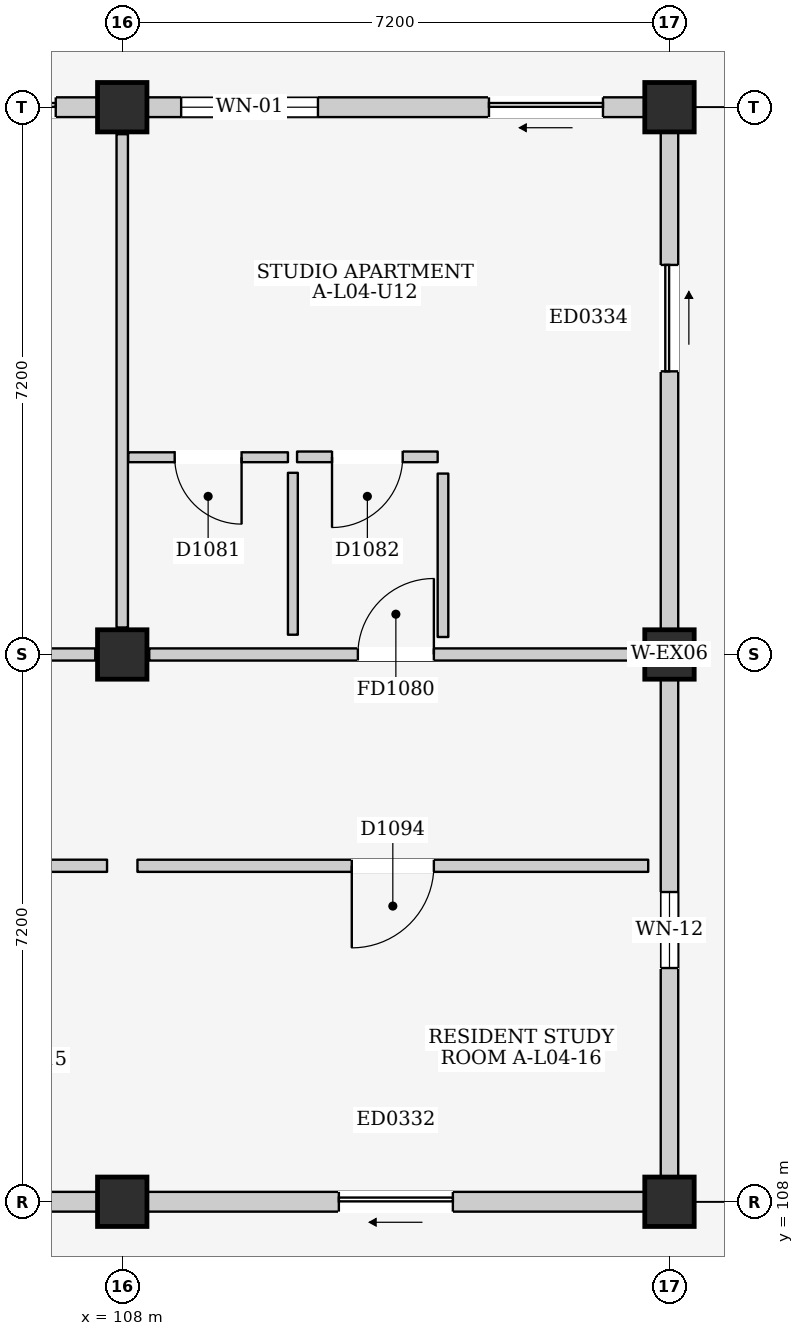
"""IFC4 building model, lengths in metres.
Left out: names, types, materials, properties, quantities, classifications, styles, units other than length and angle.
Written with IfcOpenShell. Run it as: python <this file> out.ifc"""

import sys

from ifc_helpers import new_model, si_unit, direction, frame, frame_2d, origin, origin_2d, place, context, subcontext, project, spatial, rectangle, extrude, element, fill, save


model = new_model("IFC4")
c1 = context("Model", 3, precision=1e-05, world=origin(), true_north=direction((0.0, 1.0)))
c2 = subcontext(c1, "Body", "Model", "MODEL_VIEW")
j1 = project(units=[si_unit("LENGTHUNIT", "METRE"), si_unit("PLANEANGLEUNIT", "RADIAN")], contexts=[c1])
p1 = place(None, origin())
s1 = spatial("IfcSite", under=j1, at=p1, CompositionType="ELEMENT")
p2 = place(p1, origin())
s2 = spatial("IfcBuilding", under=s1, at=p2, CompositionType="ELEMENT")
p3 = place(p2, frame((0.0, 0.0, 15.4)))
s3 = spatial("IfcBuildingStorey", under=s2, at=p3, CompositionType="ELEMENT", Elevation=15.4)
for number, where, z_axis, x_axis in (
    (1, (108.0, 108.0, 0.0), (0.0, 0.0, 1.0), (1.0, 0.0, 0.0)),
    (2, (108.0, 115.2, 0.0), (0.0, 0.0, 1.0), (1.0, 0.0, 0.0)),
    (3, (108.0, 122.4, 0.0), (0.0, 0.0, 1.0), (1.0, 0.0, 0.0)),
    (4, (115.2, 108.0, 0.0), (0.0, 0.0, 1.0), (1.0, 0.0, 0.0)),
    (5, (115.2, 115.2, 0.0), (0.0, 0.0, 1.0), (1.0, 0.0, 0.0)),
    (6, (115.2, 122.4, 0.0), (0.0, 0.0, 1.0), (1.0, 0.0, 0.0)),
):
    element("IfcColumn", number, at=place(p3, frame(where, z_axis=z_axis, x_axis=x_axis)), inside=s3, PredefinedType="COLUMN", context=c2, shape_type="SweptSolid", body=[
        extrude(rectangle(XDim=0.65, YDim=0.65, at=origin_2d()), origin(), (0.0, 0.0, 1.0), 3.2),
    ])
p4 = place(p3, frame((101.125, 122.4, 0.0), z_axis=(0.0, 0.0, 1.0), x_axis=(1.0, 0.0, 0.0)))
e7 = element("IfcWall", 7, at=p4, inside=s3, PredefinedType="ELEMENTEDWALL", context=c2, shape_type="SweptSolid", body=[
    extrude(rectangle(XDim=6.55, YDim=0.26, at=frame_2d((3.275, 0.0))), origin(), (0.0, 0.0, 1.0), 2.43),
])
p5 = place(p4, frame((4.4, 0.0, 0.0)))
e8 = element("IfcOpeningElement", 8, at=p5, cuts=e7, PredefinedType="OPENING", context=c2, shape_type="SweptSolid", body=[
    extrude(rectangle(XDim=1.6, YDim=2.12, at=frame_2d((0.8, 1.06))), frame((0.0, 0.145, 0.0), z_axis=(0.0, -1.0, 0.0), x_axis=(1.0, 0.0, 0.0)), (0.0, 0.0, 1.0), 0.29),
])
p6 = place(p4, frame((0.45, 0.0, 0.76)))
e9 = element("IfcOpeningElement", 9, at=p6, cuts=e7, PredefinedType="OPENING", context=c2, shape_type="SweptSolid", body=[
    extrude(rectangle(XDim=1.75, YDim=1.55, at=frame_2d((0.875, 0.775))), frame((0.0, 0.145, 0.0), z_axis=(0.0, -1.0, 0.0), x_axis=(1.0, 0.0, 0.0)), (0.0, 0.0, 1.0), 0.29),
])
p7 = place(p3, frame((101.125, 108.0, 0.0), z_axis=(0.0, 0.0, 1.0), x_axis=(1.0, 0.0, 0.0)))
e10 = element("IfcWall", 10, at=p7, inside=s3, PredefinedType="ELEMENTEDWALL", context=c2, shape_type="SweptSolid", body=[
    extrude(rectangle(XDim=6.55, YDim=0.26, at=frame_2d((3.275, 0.0))), origin(), (0.0, 0.0, 1.0), 2.285),
])
p8 = place(p7, frame((2.525, 0.0, 0.0)))
e11 = element("IfcOpeningElement", 11, at=p8, cuts=e10, PredefinedType="OPENING", context=c2, shape_type="SweptSolid", body=[
    extrude(rectangle(XDim=1.5, YDim=2.12, at=frame_2d((0.75, 1.06))), frame((0.0, 0.145, 0.0), z_axis=(0.0, -1.0, 0.0), x_axis=(1.0, 0.0, 0.0)), (0.0, 0.0, 1.0), 0.29),
])
p9 = place(p3, frame((108.325, 122.4, 0.0), z_axis=(0.0, 0.0, 1.0), x_axis=(1.0, 0.0, 0.0)))
e12 = element("IfcWall", 12, at=p9, inside=s3, PredefinedType="ELEMENTEDWALL", context=c2, shape_type="SweptSolid", body=[
    extrude(rectangle(XDim=6.55, YDim=0.26, at=frame_2d((3.275, 0.0))), origin(), (0.0, 0.0, 1.0), 2.43),
])
p10 = place(p9, frame((4.5, 0.0, 0.0)))
e13 = element("IfcOpeningElement", 13, at=p10, cuts=e12, PredefinedType="OPENING", context=c2, shape_type="SweptSolid", body=[
    extrude(rectangle(XDim=1.5, YDim=2.12, at=frame_2d((0.75, 1.06))), frame((0.0, 0.145, 0.0), z_axis=(0.0, -1.0, 0.0), x_axis=(1.0, 0.0, 0.0)), (0.0, 0.0, 1.0), 0.29),
])
p11 = place(p9, frame((0.45, 0.0, 0.81)))
e14 = element("IfcOpeningElement", 14, at=p11, cuts=e12, PredefinedType="OPENING", context=c2, shape_type="SweptSolid", body=[
    extrude(rectangle(XDim=1.8, YDim=1.5, at=frame_2d((0.9, 0.75))), frame((0.0, 0.145, 0.0), z_axis=(0.0, -1.0, 0.0), x_axis=(1.0, 0.0, 0.0)), (0.0, 0.0, 1.0), 0.29),
])
p12 = place(p3, frame((108.325, 108.0, 0.0), z_axis=(0.0, 0.0, 1.0), x_axis=(1.0, 0.0, 0.0)))
e15 = element("IfcWall", 15, at=p12, inside=s3, PredefinedType="ELEMENTEDWALL", context=c2, shape_type="SweptSolid", body=[
    extrude(rectangle(XDim=6.55, YDim=0.26, at=frame_2d((3.275, 0.0))), origin(), (0.0, 0.0, 1.0), 2.285),
])
p13 = place(p12, frame((2.525, 0.0, 0.0)))
e16 = element("IfcOpeningElement", 16, at=p13, cuts=e15, PredefinedType="OPENING", context=c2, shape_type="SweptSolid", body=[
    extrude(rectangle(XDim=1.5, YDim=2.12, at=frame_2d((0.75, 1.06))), frame((0.0, 0.145, 0.0), z_axis=(0.0, -1.0, 0.0), x_axis=(1.0, 0.0, 0.0)), (0.0, 0.0, 1.0), 0.29),
])
p14 = place(p3, frame((115.2, 108.325, 0.0), z_axis=(0.0, 0.0, 1.0), x_axis=(0.0, 1.0, 0.0)))
e17 = element("IfcWall", 17, at=p14, inside=s3, PredefinedType="ELEMENTEDWALL", context=c2, shape_type="SweptSolid", body=[
    extrude(rectangle(XDim=6.55, YDim=0.23, at=frame_2d((3.275, 0.0))), origin(), (0.0, 0.0, 1.0), 2.43),
])
p15 = place(p14, frame((2.75, 0.0, 1.1)))
e18 = element("IfcOpeningElement", 18, at=p15, cuts=e17, PredefinedType="OPENING", context=c2, shape_type="SweptSolid", body=[
    extrude(rectangle(XDim=1.0, YDim=0.9, at=frame_2d((0.5, 0.45))), frame((0.0, 0.13, 0.0), z_axis=(0.0, -1.0, 0.0), x_axis=(1.0, 0.0, 0.0)), (0.0, 0.0, 1.0), 0.26),
])
p16 = place(p3, frame((115.2, 115.525, 0.0), z_axis=(0.0, 0.0, 1.0), x_axis=(0.0, 1.0, 0.0)))
e19 = element("IfcWall", 19, at=p16, inside=s3, PredefinedType="ELEMENTEDWALL", context=c2, shape_type="SweptSolid", body=[
    extrude(rectangle(XDim=6.55, YDim=0.23, at=frame_2d((3.275, 0.0))), origin(), (0.0, 0.0, 1.0), 2.43),
])
p17 = place(p16, frame((3.4, 0.0, 0.0)))
e20 = element("IfcOpeningElement", 20, at=p17, cuts=e19, PredefinedType="OPENING", context=c2, shape_type="SweptSolid", body=[
    extrude(rectangle(XDim=1.4, YDim=2.1, at=frame_2d((0.7, 1.05))), frame((0.0, 0.13, 0.0), z_axis=(0.0, -1.0, 0.0), x_axis=(1.0, 0.0, 0.0)), (0.0, 0.0, 1.0), 0.26),
])
p18 = place(p3, frame((101.155, 115.2, 0.0), z_axis=(0.0, 0.0, 1.0), x_axis=(1.0, 0.0, 0.0)))
e21 = element("IfcWall", 21, at=p18, inside=s3, PredefinedType="PARTITIONING", context=c2, shape_type="SweptSolid", body=[
    extrude(rectangle(XDim=6.49, YDim=0.16, at=frame_2d((3.245, 0.0))), origin(), (0.0, 0.0, 1.0), 2.285),
])
p19 = place(p18, frame((2.745, 0.0, 0.0)))
e22 = element("IfcOpeningElement", 22, at=p19, cuts=e21, PredefinedType="OPENING", context=c2, shape_type="SweptSolid", body=[
    extrude(rectangle(XDim=1.0, YDim=2.15, at=frame_2d((0.5, 1.075))), frame((0.0, 0.095, 0.0), z_axis=(0.0, -1.0, 0.0), x_axis=(1.0, 0.0, 0.0)), (0.0, 0.0, 1.0), 0.19),
])
p20 = place(p3, frame((108.0, 115.555, 0.0), z_axis=(0.0, 0.0, 1.0), x_axis=(0.0, 1.0, 0.0)))
e23 = element("IfcWall", 23, at=p20, inside=s3, PredefinedType="PARTITIONING", context=c2, shape_type="SweptSolid", body=[
    extrude(rectangle(XDim=6.49, YDim=0.15, at=frame_2d((3.245, 0.0))), origin(), (0.0, 0.0, 1.0), 2.385),
])
p21 = place(p3, frame((108.355, 115.2, 0.0), z_axis=(0.0, 0.0, 1.0), x_axis=(1.0, 0.0, 0.0)))
e24 = element("IfcWall", 24, at=p21, inside=s3, PredefinedType="PARTITIONING", context=c2, shape_type="SweptSolid", body=[
    extrude(rectangle(XDim=6.49, YDim=0.16, at=frame_2d((3.245, 0.0))), origin(), (0.0, 0.0, 1.0), 2.285),
])
p22 = place(p21, frame((2.745, 0.0, 0.0)))
e25 = element("IfcOpeningElement", 25, at=p22, cuts=e24, PredefinedType="OPENING", context=c2, shape_type="SweptSolid", body=[
    extrude(rectangle(XDim=1.0, YDim=2.15, at=frame_2d((0.5, 1.075))), frame((0.0, 0.095, 0.0), z_axis=(0.0, -1.0, 0.0), x_axis=(1.0, 0.0, 0.0)), (0.0, 0.0, 1.0), 0.19),
])
p23 = place(p3, frame((108.08, 117.795, 0.0), z_axis=(0.0, 0.0, 1.0), x_axis=(1.0, 0.0, 0.0)))
e26 = element("IfcWall", 26, at=p23, inside=s3, PredefinedType="PARTITIONING", context=c2, shape_type="SweptSolid", body=[
    extrude(rectangle(XDim=2.1, YDim=0.13, at=frame_2d((1.05, 0.0))), origin(), (0.0, 0.0, 1.0), 2.95),
])
p24 = place(p23, frame((0.61, 0.0, 0.0)))
e27 = element("IfcOpeningElement", 27, at=p24, cuts=e26, PredefinedType="OPENING", context=c2, shape_type="SweptSolid", body=[
    extrude(rectangle(XDim=0.88, YDim=2.1, at=frame_2d((0.44, 1.05))), frame((0.0, 0.08, 0.0), z_axis=(0.0, -1.0, 0.0), x_axis=(1.0, 0.0, 0.0)), (0.0, 0.0, 1.0), 0.16),
])
p25 = place(p3, frame((110.245, 115.46, 0.0), z_axis=(0.0, 0.0, 1.0), x_axis=(0.0, 1.0, 0.0)))
e28 = element("IfcWall", 28, at=p25, inside=s3, PredefinedType="PARTITIONING", context=c2, shape_type="SweptSolid", body=[
    extrude(rectangle(XDim=2.13, YDim=0.13, at=frame_2d((1.065, 0.0))), origin(), (0.0, 0.0, 1.0), 2.95),
])
p26 = place(p3, frame((110.3, 117.8, 0.0), z_axis=(0.0, 0.0, 1.0), x_axis=(1.0, 0.0, 0.0)))
e29 = element("IfcWall", 29, at=p26, inside=s3, PredefinedType="PARTITIONING", context=c2, shape_type="SweptSolid", body=[
    extrude(rectangle(XDim=1.85, YDim=0.14, at=frame_2d((0.925, 0.0))), origin(), (0.0, 0.0, 1.0), 2.95),
])
p27 = place(p26, frame((0.46, 0.0, 0.0)))
e30 = element("IfcOpeningElement", 30, at=p27, cuts=e29, PredefinedType="OPENING", context=c2, shape_type="SweptSolid", body=[
    extrude(rectangle(XDim=0.93, YDim=2.14, at=frame_2d((0.465, 1.07))), frame((0.0, 0.085, 0.0), z_axis=(0.0, -1.0, 0.0), x_axis=(1.0, 0.0, 0.0)), (0.0, 0.0, 1.0), 0.17),
])
p28 = place(p3, frame((112.22, 115.43, 0.0), z_axis=(0.0, 0.0, 1.0), x_axis=(0.0, 1.0, 0.0)))
e31 = element("IfcWall", 31, at=p28, inside=s3, PredefinedType="PARTITIONING", context=c2, shape_type="SweptSolid", body=[
    extrude(rectangle(XDim=2.15, YDim=0.14, at=frame_2d((1.075, 0.0))), origin(), (0.0, 0.0, 1.0), 2.95),
])
p29 = place(p3, frame((101.0, 112.42, 0.0), z_axis=(0.0, 0.0, 1.0), x_axis=(1.0, 0.0, 0.0)))
e32 = element("IfcWall", 32, at=p29, inside=s3, PredefinedType="PARTITIONING", context=c2, shape_type="SweptSolid", body=[
    extrude(rectangle(XDim=6.8, YDim=0.16, at=frame_2d((3.4, 0.0))), origin(), (0.0, 0.0, 1.0), 2.95),
])
p30 = place(p29, frame((2.86, 0.0, 0.0)))
e33 = element("IfcOpeningElement", 33, at=p30, cuts=e32, PredefinedType="OPENING", context=c2, shape_type="SweptSolid", body=[
    extrude(rectangle(XDim=1.08, YDim=2.22, at=frame_2d((0.54, 1.11))), frame((0.0, 0.095, 0.0), z_axis=(0.0, -1.0, 0.0), x_axis=(1.0, 0.0, 0.0)), (0.0, 0.0, 1.0), 0.19),
])
p31 = place(p3, frame((108.2, 112.42, 0.0), z_axis=(0.0, 0.0, 1.0), x_axis=(1.0, 0.0, 0.0)))
e34 = element("IfcWall", 34, at=p31, inside=s3, PredefinedType="PARTITIONING", context=c2, shape_type="SweptSolid", body=[
    extrude(rectangle(XDim=6.72, YDim=0.16, at=frame_2d((3.36, 0.0))), origin(), (0.0, 0.0, 1.0), 2.95),
])
p32 = place(p31, frame((2.82, 0.0, 0.0)))
e35 = element("IfcOpeningElement", 35, at=p32, cuts=e34, PredefinedType="OPENING", context=c2, shape_type="SweptSolid", body=[
    extrude(rectangle(XDim=1.08, YDim=2.22, at=frame_2d((0.54, 1.11))), frame((0.0, 0.095, 0.0), z_axis=(0.0, -1.0, 0.0), x_axis=(1.0, 0.0, 0.0)), (0.0, 0.0, 1.0), 0.19),
])
p33 = place(p5, frame((1.6, 0.0, 0.0), z_axis=(0.0, 0.0, 1.0), x_axis=(-1.0, 0.0, 0.0)))
e36 = element("IfcDoor", 36, at=p33, inside=s3, OperationType="SLIDING_TO_RIGHT", PredefinedType="DOOR", context=c2, shape_type="SweptSolid", body=[
    extrude(rectangle(XDim=1.6, YDim=2.12, at=frame_2d((0.8, 1.06))), frame((0.0, 0.025, 0.0), z_axis=(0.0, -1.0, 0.0), x_axis=(1.0, 0.0, 0.0)), (0.0, 0.0, 1.0), 0.05),
])
fill(e8, e36)
p34 = place(p10, frame((1.5, 0.0, 0.0), z_axis=(0.0, 0.0, 1.0), x_axis=(-1.0, 0.0, 0.0)))
e37 = element("IfcDoor", 37, at=p34, inside=s3, OperationType="SLIDING_TO_LEFT", PredefinedType="DOOR", context=c2, shape_type="SweptSolid", body=[
    extrude(rectangle(XDim=1.5, YDim=2.12, at=frame_2d((0.75, 1.06))), frame((0.0, 0.025, 0.0), z_axis=(0.0, -1.0, 0.0), x_axis=(1.0, 0.0, 0.0)), (0.0, 0.0, 1.0), 0.05),
])
fill(e13, e37)
p35 = place(p11, origin())
e38 = element("IfcWindow", 38, at=p35, inside=s3, PartitioningType="DOUBLE_PANEL_VERTICAL", PredefinedType="WINDOW", context=c2, shape_type="SweptSolid", body=[
    extrude(rectangle(XDim=1.8, YDim=1.5, at=frame_2d((0.9, 0.75))), frame((0.0, 0.03, 0.0), z_axis=(0.0, -1.0, 0.0), x_axis=(1.0, 0.0, 0.0)), (0.0, 0.0, 1.0), 0.06),
])
fill(e14, e38)
p36 = place(p13, frame((1.5, 0.0, 0.0), z_axis=(0.0, 0.0, 1.0), x_axis=(-1.0, 0.0, 0.0)))
e39 = element("IfcDoor", 39, at=p36, inside=s3, OperationType="SLIDING_TO_LEFT", PredefinedType="DOOR", context=c2, shape_type="SweptSolid", body=[
    extrude(rectangle(XDim=1.5, YDim=2.12, at=frame_2d((0.75, 1.06))), frame((0.0, 0.025, 0.0), z_axis=(0.0, -1.0, 0.0), x_axis=(1.0, 0.0, 0.0)), (0.0, 0.0, 1.0), 0.05),
])
fill(e16, e39)
p37 = place(p15, origin())
e40 = element("IfcWindow", 40, at=p37, inside=s3, PartitioningType="SINGLE_PANEL", PredefinedType="WINDOW", context=c2, shape_type="SweptSolid", body=[
    extrude(rectangle(XDim=1.0, YDim=0.9, at=frame_2d((0.5, 0.45))), frame((0.0, 0.03, 0.0), z_axis=(0.0, -1.0, 0.0), x_axis=(1.0, 0.0, 0.0)), (0.0, 0.0, 1.0), 0.06),
])
fill(e18, e40)
p38 = place(p17, frame((1.4, 0.0, 0.0), z_axis=(0.0, 0.0, 1.0), x_axis=(-1.0, 0.0, 0.0)))
e41 = element("IfcDoor", 41, at=p38, inside=s3, OperationType="SLIDING_TO_RIGHT", PredefinedType="DOOR", context=c2, shape_type="SweptSolid", body=[
    extrude(rectangle(XDim=1.4, YDim=2.1, at=frame_2d((0.7, 1.05))), frame((0.0, 0.025, 0.0), z_axis=(0.0, -1.0, 0.0), x_axis=(1.0, 0.0, 0.0)), (0.0, 0.0, 1.0), 0.05),
])
fill(e20, e41)
p39 = place(p22, origin())
e42 = element("IfcDoor", 42, at=p39, inside=s3, OperationType="SINGLE_SWING_RIGHT", PredefinedType="DOOR", context=c2, shape_type="SweptSolid", body=[
    extrude(rectangle(XDim=1.0, YDim=2.15, at=frame_2d((0.5, 1.075))), frame((0.0, 0.025, 0.0), z_axis=(0.0, -1.0, 0.0), x_axis=(1.0, 0.0, 0.0)), (0.0, 0.0, 1.0), 0.05),
])
fill(e25, e42)
p40 = place(p24, frame((0.88, 0.0, 0.0), z_axis=(0.0, 0.0, 1.0), x_axis=(-1.0, 0.0, 0.0)))
e43 = element("IfcDoor", 43, at=p40, inside=s3, OperationType="SINGLE_SWING_LEFT", PredefinedType="DOOR", context=c2, shape_type="SweptSolid", body=[
    extrude(rectangle(XDim=0.88, YDim=2.1, at=frame_2d((0.44, 1.05))), frame((0.0, 0.025, 0.0), z_axis=(0.0, -1.0, 0.0), x_axis=(1.0, 0.0, 0.0)), (0.0, 0.0, 1.0), 0.05),
])
fill(e27, e43)
p41 = place(p27, frame((0.93, 0.0, 0.0), z_axis=(0.0, 0.0, 1.0), x_axis=(-1.0, 0.0, 0.0)))
e44 = element("IfcDoor", 44, at=p41, inside=s3, OperationType="SINGLE_SWING_RIGHT", PredefinedType="DOOR", context=c2, shape_type="SweptSolid", body=[
    extrude(rectangle(XDim=0.93, YDim=2.14, at=frame_2d((0.465, 1.07))), frame((0.0, 0.025, 0.0), z_axis=(0.0, -1.0, 0.0), x_axis=(1.0, 0.0, 0.0)), (0.0, 0.0, 1.0), 0.05),
])
fill(e30, e44)
p42 = place(p32, frame((1.08, 0.0, 0.0), z_axis=(0.0, 0.0, 1.0), x_axis=(-1.0, 0.0, 0.0)))
e45 = element("IfcDoor", 45, at=p42, inside=s3, OperationType="SINGLE_SWING_RIGHT", PredefinedType="DOOR", context=c2, shape_type="SweptSolid", body=[
    extrude(rectangle(XDim=1.08, YDim=2.22, at=frame_2d((0.54, 1.11))), frame((0.0, 0.025, 0.0), z_axis=(0.0, -1.0, 0.0), x_axis=(1.0, 0.0, 0.0)), (0.0, 0.0, 1.0), 0.05),
])
fill(e35, e45)
save(model, sys.argv[1])
